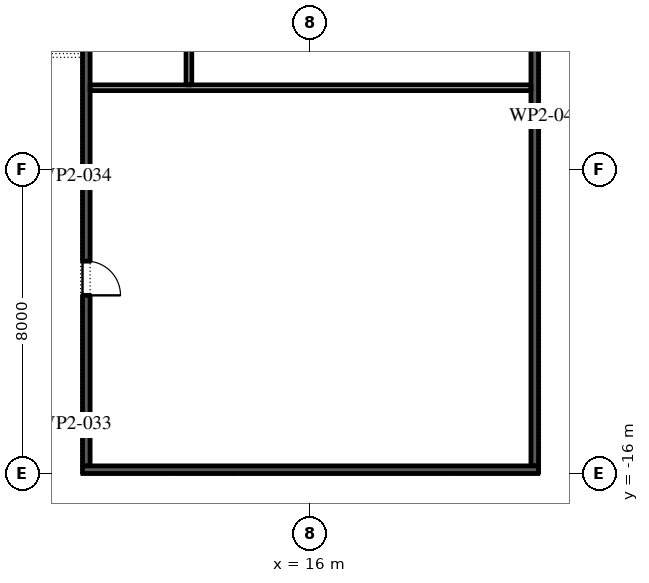
"""IFC4 building model, lengths in metres.
Left out: names, types, materials, properties, quantities, classifications, styles, units other than length and angle.
Written with IfcOpenShell. Run it as: python <this file> out.ifc"""

import sys

from ifc_helpers import new_model, si_unit, direction, frame, frame_2d, origin, place, context, subcontext, project, spatial, rectangle, extrude, element, fill, save


model = new_model("IFC4")
c1 = context("Model", 3, precision=1e-05, world=origin(), true_north=direction((0.0, 1.0)))
c2 = subcontext(c1, "Body", "Model", "MODEL_VIEW")
j1 = project(units=[si_unit("LENGTHUNIT", "METRE"), si_unit("PLANEANGLEUNIT", "RADIAN")], contexts=[c1])
p1 = place(None, origin())
s1 = spatial("IfcSite", under=j1, at=p1, CompositionType="ELEMENT")
p2 = place(p1, origin())
s2 = spatial("IfcBuilding", under=s1, at=p2, CompositionType="ELEMENT")
p3 = place(p2, frame((0.0, 0.0, 69.0)))
s3 = spatial("IfcBuildingStorey", under=s2, at=p3, CompositionType="ELEMENT", Elevation=69.0)
p4 = place(p3, frame((21.9, -15.8, 0.0), z_axis=(0.0, 0.0, 1.0), x_axis=(0.0, 1.0, 0.0)))
e1 = element("IfcWall", 1, at=p4, inside=s3, PredefinedType="SHEAR", context=c2, shape_type="SweptSolid", body=[
    extrude(rectangle(XDim=13.05, YDim=0.2, at=frame_2d((6.525, 0.0))), origin(), (0.0, 0.0, 1.0), 4.0),
])
p5 = place(p4, frame((11.087, 0.0, 0.0)))
e2 = element("IfcOpeningElement", 2, at=p5, cuts=e1, PredefinedType="OPENING", context=c2, shape_type="SweptSolid", body=[
    extrude(rectangle(XDim=0.9, YDim=2.1, at=frame_2d((0.45, 1.05))), frame((0.0, 0.11, 0.0), z_axis=(0.0, -1.0, 0.0), x_axis=(1.0, 0.0, 0.0)), (0.0, 0.0, 1.0), 0.22),
])
p6 = place(p3, frame((10.1, -15.8, 0.0), z_axis=(0.0, 0.0, 1.0), x_axis=(0.0, 1.0, 0.0)))
e3 = element("IfcWall", 3, at=p6, inside=s3, PredefinedType="SHEAR", context=c2, shape_type="SweptSolid", body=[
    extrude(rectangle(XDim=13.05, YDim=0.2, at=frame_2d((6.525, 0.0))), origin(), (0.0, 0.0, 1.0), 4.0),
])
p7 = place(p6, frame((4.488, 0.0, 0.0)))
e4 = element("IfcOpeningElement", 4, at=p7, cuts=e3, PredefinedType="OPENING", context=c2, shape_type="SweptSolid", body=[
    extrude(rectangle(XDim=0.9, YDim=2.1, at=frame_2d((0.45, 1.05))), frame((0.0, 0.11, 0.0), z_axis=(0.0, -1.0, 0.0), x_axis=(1.0, 0.0, 0.0)), (0.0, 0.0, 1.0), 0.22),
])
p8 = place(p6, frame((11.038, 0.0, 0.0)))
e5 = element("IfcOpeningElement", 5, at=p8, cuts=e3, PredefinedType="OPENING", context=c2, shape_type="SweptSolid", body=[
    extrude(rectangle(XDim=1.0, YDim=2.1, at=frame_2d((0.5, 1.05))), frame((0.0, 0.11, 0.0), z_axis=(0.0, -1.0, 0.0), x_axis=(1.0, 0.0, 0.0)), (0.0, 0.0, 1.0), 0.22),
])
p9 = place(p3, frame((10.0, -15.9, 0.0), z_axis=(0.0, 0.0, 1.0), x_axis=(1.0, 0.0, 0.0)))
e6 = element("IfcWall", 6, at=p9, inside=s3, PredefinedType="SHEAR", context=c2, shape_type="SweptSolid", body=[
    extrude(rectangle(XDim=12.0, YDim=0.2, at=frame_2d((6.0, 0.0))), origin(), (0.0, 0.0, 1.0), 4.0),
])
p10 = place(p3, frame((10.2, -5.85, 0.0), z_axis=(0.0, 0.0, 1.0), x_axis=(1.0, 0.0, 0.0)))
e7 = element("IfcWall", 7, at=p10, inside=s3, PredefinedType="PARTITIONING", context=c2, shape_type="SweptSolid", body=[
    extrude(rectangle(XDim=11.6, YDim=0.15, at=frame_2d((5.8, 0.0))), origin(), (0.0, 0.0, 1.0), 4.0),
])
p11 = place(p3, frame((12.8, -5.775, 0.0), z_axis=(0.0, 0.0, 1.0), x_axis=(0.0, 1.0, 0.0)))
e8 = element("IfcWall", 8, at=p11, inside=s3, PredefinedType="PARTITIONING", context=c2, shape_type="SweptSolid", body=[
    extrude(rectangle(XDim=3.025, YDim=0.15, at=frame_2d((1.512, 0.0))), origin(), (0.0, 0.0, 1.0), 4.0),
])
p12 = place(p7, frame((0.9, -0.15, 0.0), z_axis=(0.0, 0.0, 1.0), x_axis=(-1.0, 0.0, 0.0)))
e9 = element("IfcDoor", 9, at=p12, inside=s3, OperationType="SINGLE_SWING_LEFT", PredefinedType="DOOR", context=c2, shape_type="SweptSolid", body=[
    extrude(rectangle(XDim=0.9, YDim=2.1, at=frame_2d((0.45, 1.05))), frame((0.0, -0.05, 0.0), z_axis=(0.0, -1.0, 0.0), x_axis=(1.0, 0.0, 0.0)), (0.0, 0.0, 1.0), 0.05),
])
fill(e4, e9)
save(model, sys.argv[1])
